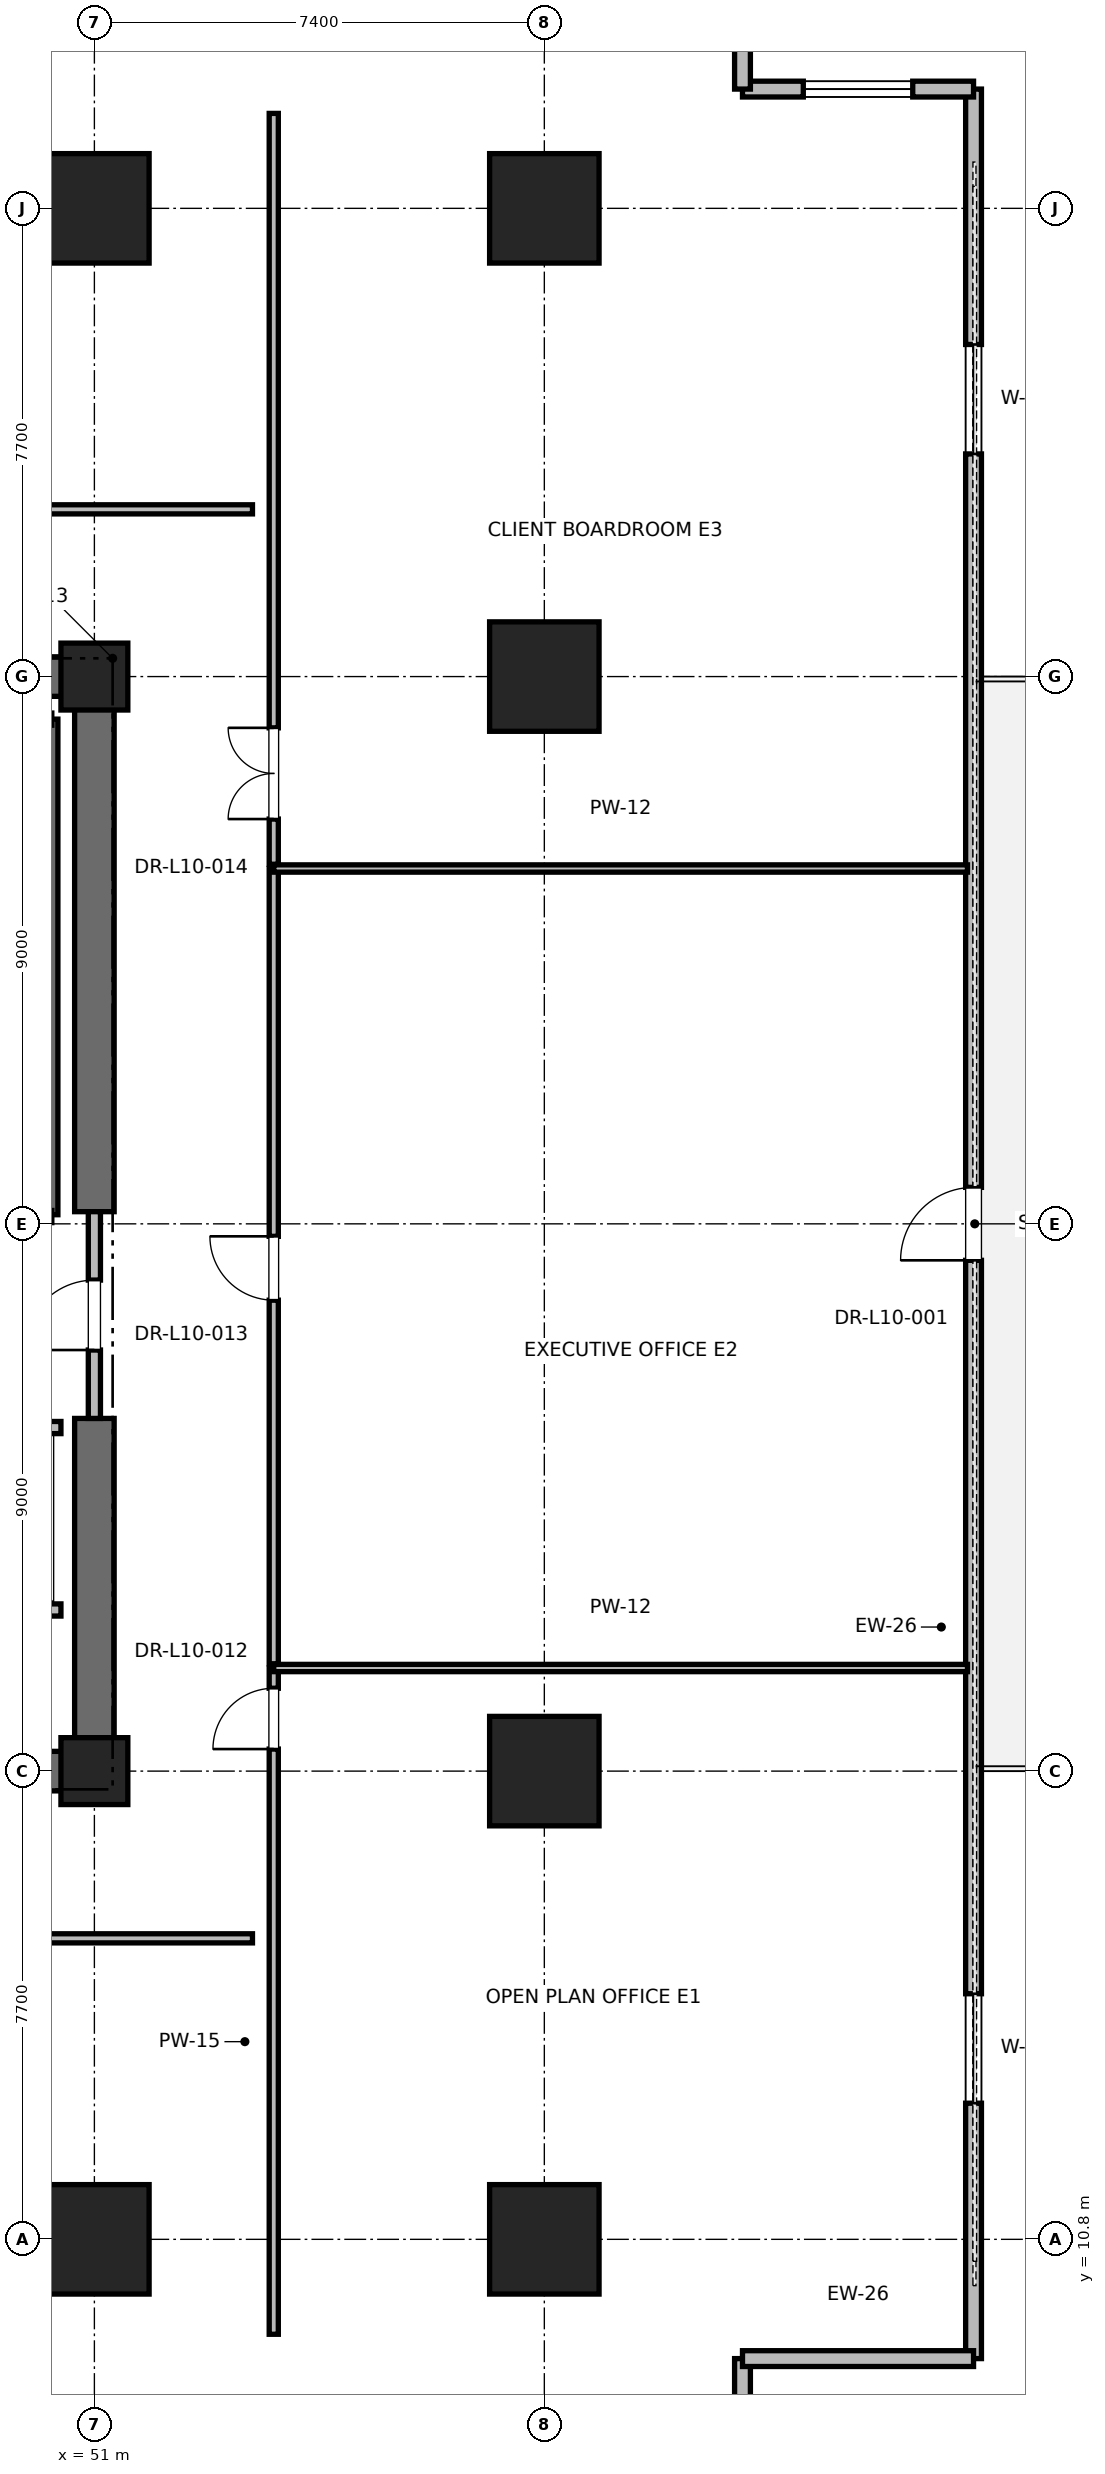
"""IFC4 building model, lengths in metres.
Left out: names, types, materials, properties, quantities, classifications, styles, units other than length and angle.
Written with IfcOpenShell. Run it as: python <this file> out.ifc"""

import sys

from ifc_helpers import new_model, si_unit, direction, frame, frame_2d, origin, origin_2d, place, context, subcontext, project, spatial, rectangle, extrude, element, fill, save


model = new_model("IFC4")
c1 = context("Model", 3, precision=1e-05, world=origin(), true_north=direction((0.0, 1.0)))
c2 = subcontext(c1, "Body", "Model", "MODEL_VIEW")
j1 = project(units=[si_unit("LENGTHUNIT", "METRE"), si_unit("PLANEANGLEUNIT", "RADIAN")], contexts=[c1])
p1 = place(None, origin())
s1 = spatial("IfcSite", under=j1, at=p1, CompositionType="ELEMENT")
p2 = place(p1, origin())
s2 = spatial("IfcBuilding", under=s1, at=p2, CompositionType="ELEMENT")
p3 = place(p2, frame((0.0, 0.0, 47.6)))
s3 = spatial("IfcBuildingStorey", under=s2, at=p3, CompositionType="ELEMENT", Elevation=47.6)
for number, where, z_axis, x_axis in (
    (1, (51.0, 10.8, 0.0), (0.0, 0.0, 1.0), (1.0, 0.0, 0.0)),
    (2, (51.0, 44.2, 0.0), (0.0, 0.0, 1.0), (1.0, 0.0, 0.0)),
    (3, (58.4, 18.5, 0.0), (0.0, 0.0, 1.0), (1.0, 0.0, 0.0)),
    (4, (58.4, 36.5, 0.0), (0.0, 0.0, 1.0), (1.0, 0.0, 0.0)),
    (5, (58.4, 10.8, 0.0), (0.0, 0.0, 1.0), (1.0, 0.0, 0.0)),
    (6, (58.4, 44.2, 0.0), (0.0, 0.0, 1.0), (1.0, 0.0, 0.0)),
):
    element("IfcColumn", number, at=place(p3, frame(where, z_axis=z_axis, x_axis=x_axis)), inside=s3, PredefinedType="COLUMN", context=c2, shape_type="SweptSolid", body=[
        extrude(rectangle(XDim=1.8, YDim=1.8, at=origin_2d()), origin(), (0.0, 0.0, 1.0), 4.0),
    ])
for number, where, z_axis, x_axis in (
    (7, (51.0, 18.5, 0.0), (0.0, 0.0, 1.0), (1.0, 0.0, 0.0)),
    (8, (51.0, 36.5, 0.0), (0.0, 0.0, 1.0), (1.0, 0.0, 0.0)),
):
    element("IfcColumn", number, at=place(p3, frame(where, z_axis=z_axis, x_axis=x_axis)), inside=s3, PredefinedType="PILASTER", context=c2, shape_type="SweptSolid", body=[
        extrude(rectangle(XDim=1.1, YDim=1.1, at=origin_2d()), origin(), (0.0, 0.0, 1.0), 4.0),
    ])
p4 = place(p3, frame((41.8, 18.5, 0.0), z_axis=(0.0, 0.0, 1.0), x_axis=(1.0, 0.0, 0.0)))
e9 = element("IfcWall", 9, at=p4, inside=s3, PredefinedType="SHEAR", context=c2, shape_type="SweptSolid", body=[
    extrude(rectangle(XDim=9.2, YDim=0.65, at=frame_2d((4.6, 0.0))), origin(), (0.0, 0.0, 1.0), 3.76),
])
for number, where, z_axis, x_axis in (
    (10, (45.2, 36.5, 0.0), (0.0, 0.0, 1.0), (1.0, 0.0, 0.0)),
    (11, (51.0, 18.5, 0.0), (0.0, 0.0, 1.0), (0.0, 1.0, 0.0)),
):
    element("IfcWall", number, at=place(p3, frame(where, z_axis=z_axis, x_axis=x_axis)), inside=s3, PredefinedType="SHEAR", context=c2, shape_type="SweptSolid", body=[
        extrude(rectangle(XDim=5.8, YDim=0.65, at=frame_2d((2.9, 0.0))), origin(), (0.0, 0.0, 1.0), 3.76),
    ])
p5 = place(p3, frame((51.0, 27.7, 0.0), z_axis=(0.0, 0.0, 1.0), x_axis=(0.0, 1.0, 0.0)))
e12 = element("IfcWall", 12, at=p5, inside=s3, PredefinedType="SHEAR", context=c2, shape_type="SweptSolid", body=[
    extrude(rectangle(XDim=8.8, YDim=0.65, at=frame_2d((4.4, 0.0))), origin(), (0.0, 0.0, 1.0), 3.76),
])
p6 = place(p3, frame((65.459, 8.839, 0.0), z_axis=(0.0, 0.0, 1.0), x_axis=(0.0, 1.0, 0.0)))
e13 = element("IfcWall", 13, at=p6, inside=s3, PredefinedType="PARAPET", context=c2, shape_type="SweptSolid", body=[
    extrude(rectangle(XDim=37.323, YDim=0.26, at=frame_2d((18.661, 0.0))), origin(), (0.0, 0.0, 1.0), 2.889),
])
p7 = place(p6, frame((4.2, 0.0, 0.85)))
e14 = element("IfcOpeningElement", 14, at=p7, cuts=e13, PredefinedType="OPENING", context=c2, shape_type="SweptSolid", body=[
    extrude(rectangle(XDim=1.8, YDim=2.2, at=frame_2d((0.9, 1.1))), frame((0.0, 0.13, 0.0), z_axis=(0.0, -1.0, 0.0), x_axis=(1.0, 0.0, 0.0)), (0.0, 0.0, 1.0), 0.26),
])
p8 = place(p6, frame((18.061, 0.0, 0.0)))
e15 = element("IfcOpeningElement", 15, at=p8, cuts=e13, PredefinedType="OPENING", context=c2, shape_type="SweptSolid", body=[
    extrude(rectangle(XDim=1.2, YDim=2.2, at=frame_2d((0.6, 1.1))), frame((0.0, 0.13, 0.0), z_axis=(0.0, -1.0, 0.0), x_axis=(1.0, 0.0, 0.0)), (0.0, 0.0, 1.0), 0.26),
])
p9 = place(p6, frame((31.323, 0.0, 0.85)))
e16 = element("IfcOpeningElement", 16, at=p9, cuts=e13, PredefinedType="OPENING", context=c2, shape_type="SweptSolid", body=[
    extrude(rectangle(XDim=1.8, YDim=2.2, at=frame_2d((0.9, 1.1))), frame((0.0, 0.13, 0.0), z_axis=(0.0, -1.0, 0.0), x_axis=(1.0, 0.0, 0.0)), (0.0, 0.0, 1.0), 0.26),
])
p10 = place(p3, frame((61.659, 5.439, 0.0), z_axis=(0.0, 0.0, 1.0), x_axis=(0.0, 1.0, 0.0)))
e17 = element("IfcWall", 17, at=p10, inside=s3, PredefinedType="PARAPET", context=c2, shape_type="SweptSolid", body=[
    extrude(rectangle(XDim=3.4, YDim=0.26, at=frame_2d((1.7, 0.0))), origin(), (0.0, 0.0, 1.0), 3.76),
])
p11 = place(p10, frame((0.8, 0.0, 0.85)))
e18 = element("IfcOpeningElement", 18, at=p11, cuts=e17, PredefinedType="OPENING", context=c2, shape_type="SweptSolid", body=[
    extrude(rectangle(XDim=1.8, YDim=2.2, at=frame_2d((0.9, 1.1))), frame((0.0, 0.13, 0.0), z_axis=(0.0, -1.0, 0.0), x_axis=(1.0, 0.0, 0.0)), (0.0, 0.0, 1.0), 0.26),
])
p12 = place(p3, frame((61.659, 8.839, 0.0), z_axis=(0.0, 0.0, 1.0), x_axis=(1.0, 0.0, 0.0)))
e19 = element("IfcWall", 19, at=p12, inside=s3, PredefinedType="PARAPET", context=c2, shape_type="SweptSolid", body=[
    extrude(rectangle(XDim=3.8, YDim=0.26, at=frame_2d((1.9, 0.0))), origin(), (0.0, 0.0, 1.0), 3.76),
])
p13 = place(p3, frame((65.459, 46.161, 0.0), z_axis=(0.0, 0.0, 1.0), x_axis=(-1.0, 0.0, 0.0)))
e20 = element("IfcWall", 20, at=p13, inside=s3, PredefinedType="PARAPET", context=c2, shape_type="SweptSolid", body=[
    extrude(rectangle(XDim=3.8, YDim=0.26, at=frame_2d((1.9, 0.0))), origin(), (0.0, 0.0, 1.0), 3.76),
])
p14 = place(p13, frame((1.0, 0.0, 0.85)))
e21 = element("IfcOpeningElement", 21, at=p14, cuts=e20, PredefinedType="OPENING", context=c2, shape_type="SweptSolid", body=[
    extrude(rectangle(XDim=1.8, YDim=2.2, at=frame_2d((0.9, 1.1))), frame((0.0, 0.13, 0.0), z_axis=(0.0, -1.0, 0.0), x_axis=(1.0, 0.0, 0.0)), (0.0, 0.0, 1.0), 0.26),
])
p15 = place(p3, frame((61.659, 46.161, 0.0), z_axis=(0.0, 0.0, 1.0), x_axis=(0.0, 1.0, 0.0)))
e22 = element("IfcWall", 22, at=p15, inside=s3, PredefinedType="PARAPET", context=c2, shape_type="SweptSolid", body=[
    extrude(rectangle(XDim=3.4, YDim=0.26, at=frame_2d((1.7, 0.0))), origin(), (0.0, 0.0, 1.0), 3.76),
])
p16 = place(p3, frame((50.3, 27.65, 0.0), z_axis=(0.0, 0.0, 1.0), x_axis=(0.0, 1.0, 0.0)))
e23 = element("IfcWall", 23, at=p16, inside=s3, PredefinedType="SOLIDWALL", context=c2, shape_type="SweptSolid", body=[
    extrude(rectangle(XDim=8.15, YDim=0.2, at=frame_2d((4.075, 0.0))), origin(), (0.0, 0.0, 1.0), 3.76),
])
p17 = place(p3, frame((51.0, 24.3, 0.0), z_axis=(0.0, 0.0, 1.0), x_axis=(0.0, 1.0, 0.0)))
e24 = element("IfcWall", 24, at=p17, inside=s3, PredefinedType="PARTITIONING", context=c2, shape_type="SweptSolid", body=[
    extrude(rectangle(XDim=3.4, YDim=0.2, at=frame_2d((1.7, 0.0))), origin(), (0.0, 0.0, 1.0), 2.54),
])
p18 = place(p17, frame((1.125, 0.0, 0.0)))
e25 = element("IfcOpeningElement", 25, at=p18, cuts=e24, PredefinedType="OPENING", context=c2, shape_type="SweptSolid", body=[
    extrude(rectangle(XDim=1.15, YDim=2.2, at=frame_2d((0.575, 1.1))), frame((0.0, 0.1, 0.0), z_axis=(0.0, -1.0, 0.0), x_axis=(1.0, 0.0, 0.0)), (0.0, 0.0, 1.0), 0.2),
])
p19 = place(p3, frame((47.85, 21.15, 0.0), z_axis=(0.0, 0.0, 1.0), x_axis=(1.0, 0.0, 0.0)))
e26 = element("IfcWall", 26, at=p19, inside=s3, PredefinedType="SOLIDWALL", context=c2, shape_type="SweptSolid", body=[
    extrude(rectangle(XDim=2.6, YDim=0.2, at=frame_2d((1.3, 0.0))), origin(), (0.0, 0.0, 1.0), 3.76),
])
p20 = place(p3, frame((50.45, 24.15, 0.0), z_axis=(0.0, 0.0, 1.0), x_axis=(-1.0, 0.0, 0.0)))
e27 = element("IfcWall", 27, at=p20, inside=s3, PredefinedType="SOLIDWALL", context=c2, shape_type="SweptSolid", body=[
    extrude(rectangle(XDim=2.6, YDim=0.2, at=frame_2d((1.3, 0.0))), origin(), (0.0, 0.0, 1.0), 2.54),
])
p21 = place(p20, frame((0.75, 0.0, 0.0)))
e28 = element("IfcOpeningElement", 28, at=p21, cuts=e27, PredefinedType="OPENING", context=c2, shape_type="SweptSolid", body=[
    extrude(rectangle(XDim=1.1, YDim=2.2, at=frame_2d((0.55, 1.1))), frame((0.0, 0.1, 0.0), z_axis=(0.0, -1.0, 0.0), x_axis=(1.0, 0.0, 0.0)), (0.0, 0.0, 1.0), 0.2),
])
p22 = place(p3, frame((43.878, 39.25, 0.0), z_axis=(0.0, 0.0, 1.0), x_axis=(1.0, 0.0, 0.0)))
e29 = element("IfcWall", 29, at=p22, inside=s3, PredefinedType="PARTITIONING", context=c2, shape_type="SweptSolid", body=[
    extrude(rectangle(XDim=9.722, YDim=0.15, at=frame_2d((4.861, 0.0))), origin(), (0.0, 0.0, 1.0), 2.85),
])
p23 = place(p22, frame((4.311, 0.0, 0.0)))
e30 = element("IfcOpeningElement", 30, at=p23, cuts=e29, PredefinedType="OPENING", context=c2, shape_type="SweptSolid", body=[
    extrude(rectangle(XDim=1.0, YDim=2.15, at=frame_2d((0.5, 1.075))), frame((0.0, 0.075, 0.0), z_axis=(0.0, -1.0, 0.0), x_axis=(1.0, 0.0, 0.0)), (0.0, 0.0, 1.0), 0.15),
])
p24 = place(p3, frame((38.982, 15.75, 0.0), z_axis=(0.0, 0.0, 1.0), x_axis=(1.0, 0.0, 0.0)))
e31 = element("IfcWall", 31, at=p24, inside=s3, PredefinedType="PARTITIONING", context=c2, shape_type="SweptSolid", body=[
    extrude(rectangle(XDim=14.618, YDim=0.15, at=frame_2d((7.309, 0.0))), origin(), (0.0, 0.0, 1.0), 2.85),
])
p25 = place(p24, frame((6.759, 0.0, 0.0)))
e32 = element("IfcOpeningElement", 32, at=p25, cuts=e31, PredefinedType="OPENING", context=c2, shape_type="SweptSolid", body=[
    extrude(rectangle(XDim=1.0, YDim=2.15, at=frame_2d((0.5, 1.075))), frame((0.0, 0.075, 0.0), z_axis=(0.0, -1.0, 0.0), x_axis=(1.0, 0.0, 0.0)), (0.0, 0.0, 1.0), 0.15),
])
p26 = place(p3, frame((53.95, 9.239, 0.0), z_axis=(0.0, 0.0, 1.0), x_axis=(0.0, 1.0, 0.0)))
e33 = element("IfcWall", 33, at=p26, inside=s3, PredefinedType="PARTITIONING", context=c2, shape_type="SweptSolid", body=[
    extrude(rectangle(XDim=10.957, YDim=0.15, at=frame_2d((5.479, 0.0))), origin(), (0.0, 0.0, 1.0), 2.85),
])
p27 = place(p26, frame((9.624, 0.0, 0.0)))
e34 = element("IfcOpeningElement", 34, at=p27, cuts=e33, PredefinedType="OPENING", context=c2, shape_type="SweptSolid", body=[
    extrude(rectangle(XDim=1.0, YDim=2.15, at=frame_2d((0.5, 1.075))), frame((0.0, 0.075, 0.0), z_axis=(0.0, -1.0, 0.0), x_axis=(1.0, 0.0, 0.0)), (0.0, 0.0, 1.0), 0.15),
])
p28 = place(p3, frame((53.95, 20.196, 0.0), z_axis=(0.0, 0.0, 1.0), x_axis=(1.0, 0.0, 0.0)))
e35 = element("IfcWall", 35, at=p28, inside=s3, PredefinedType="PARTITIONING", context=c2, shape_type="SweptSolid", body=[
    extrude(rectangle(XDim=11.409, YDim=0.12, at=frame_2d((5.705, 0.0))), origin(), (0.0, 0.0, 1.0), 2.85),
])
p29 = place(p3, frame((53.95, 20.265, 0.0), z_axis=(0.0, 0.0, 1.0), x_axis=(0.0, 1.0, 0.0)))
e36 = element("IfcWall", 36, at=p29, inside=s3, PredefinedType="PARTITIONING", context=c2, shape_type="SweptSolid", body=[
    extrude(rectangle(XDim=13.078, YDim=0.15, at=frame_2d((6.539, 0.0))), origin(), (0.0, 0.0, 1.0), 2.85),
])
p30 = place(p29, frame((5.979, 0.0, 0.0)))
e37 = element("IfcOpeningElement", 37, at=p30, cuts=e36, PredefinedType="OPENING", context=c2, shape_type="SweptSolid", body=[
    extrude(rectangle(XDim=1.05, YDim=2.2, at=frame_2d((0.525, 1.1))), frame((0.0, 0.075, 0.0), z_axis=(0.0, -1.0, 0.0), x_axis=(1.0, 0.0, 0.0)), (0.0, 0.0, 1.0), 0.15),
])
p31 = place(p3, frame((53.95, 33.344, 0.0), z_axis=(0.0, 0.0, 1.0), x_axis=(1.0, 0.0, 0.0)))
e38 = element("IfcWall", 38, at=p31, inside=s3, PredefinedType="PARTITIONING", context=c2, shape_type="SweptSolid", body=[
    extrude(rectangle(XDim=11.409, YDim=0.12, at=frame_2d((5.705, 0.0))), origin(), (0.0, 0.0, 1.0), 2.85),
])
p32 = place(p3, frame((53.95, 33.414, 0.0), z_axis=(0.0, 0.0, 1.0), x_axis=(0.0, 1.0, 0.0)))
e39 = element("IfcWall", 39, at=p32, inside=s3, PredefinedType="PARTITIONING", context=c2, shape_type="SweptSolid", body=[
    extrude(rectangle(XDim=12.348, YDim=0.15, at=frame_2d((6.174, 0.0))), origin(), (0.0, 0.0, 1.0), 2.85),
])
p33 = place(p32, frame((0.743, 0.0, 0.0)))
e40 = element("IfcOpeningElement", 40, at=p33, cuts=e39, PredefinedType="OPENING", context=c2, shape_type="SweptSolid", body=[
    extrude(rectangle(XDim=1.5, YDim=2.25, at=frame_2d((0.75, 1.125))), frame((0.0, 0.075, 0.0), z_axis=(0.0, -1.0, 0.0), x_axis=(1.0, 0.0, 0.0)), (0.0, 0.0, 1.0), 0.15),
])
p34 = place(p7, origin())
e41 = element("IfcWindow", 41, at=p34, inside=s3, PartitioningType="SINGLE_PANEL", PredefinedType="WINDOW", context=c2, shape_type="SweptSolid", body=[
    extrude(rectangle(XDim=1.8, YDim=2.2, at=frame_2d((0.9, 1.1))), frame((0.0, 0.03, 0.0), z_axis=(0.0, -1.0, 0.0), x_axis=(1.0, 0.0, 0.0)), (0.0, 0.0, 1.0), 0.06),
])
fill(e14, e41)
p35 = place(p8, origin())
e42 = element("IfcDoor", 42, at=p35, inside=s3, OperationType="SINGLE_SWING_LEFT", PredefinedType="DOOR", context=c2, shape_type="SweptSolid", body=[
    extrude(rectangle(XDim=1.2, YDim=2.2, at=frame_2d((0.6, 1.1))), frame((0.0, 0.025, 0.0), z_axis=(0.0, -1.0, 0.0), x_axis=(1.0, 0.0, 0.0)), (0.0, 0.0, 1.0), 0.05),
])
fill(e15, e42)
p36 = place(p9, origin())
e43 = element("IfcWindow", 43, at=p36, inside=s3, PartitioningType="SINGLE_PANEL", PredefinedType="WINDOW", context=c2, shape_type="SweptSolid", body=[
    extrude(rectangle(XDim=1.8, YDim=2.2, at=frame_2d((0.9, 1.1))), frame((0.0, 0.03, 0.0), z_axis=(0.0, -1.0, 0.0), x_axis=(1.0, 0.0, 0.0)), (0.0, 0.0, 1.0), 0.06),
])
fill(e16, e43)
p37 = place(p14, origin())
e44 = element("IfcWindow", 44, at=p37, inside=s3, PartitioningType="SINGLE_PANEL", PredefinedType="WINDOW", context=c2, shape_type="SweptSolid", body=[
    extrude(rectangle(XDim=1.8, YDim=2.2, at=frame_2d((0.9, 1.1))), frame((0.0, 0.03, 0.0), z_axis=(0.0, -1.0, 0.0), x_axis=(1.0, 0.0, 0.0)), (0.0, 0.0, 1.0), 0.06),
])
fill(e21, e44)
p38 = place(p18, origin())
e45 = element("IfcDoor", 45, at=p38, inside=s3, OperationType="SINGLE_SWING_LEFT", PredefinedType="DOOR", context=c2, shape_type="SweptSolid", body=[
    extrude(rectangle(XDim=1.15, YDim=2.2, at=frame_2d((0.575, 1.1))), frame((0.0, 0.025, 0.0), z_axis=(0.0, -1.0, 0.0), x_axis=(1.0, 0.0, 0.0)), (0.0, 0.0, 1.0), 0.05),
])
fill(e25, e45)
p39 = place(p27, origin())
e46 = element("IfcDoor", 46, at=p39, inside=s3, OperationType="SINGLE_SWING_LEFT", PredefinedType="DOOR", context=c2, shape_type="SweptSolid", body=[
    extrude(rectangle(XDim=1.0, YDim=2.15, at=frame_2d((0.5, 1.075))), frame((0.0, 0.025, 0.0), z_axis=(0.0, -1.0, 0.0), x_axis=(1.0, 0.0, 0.0)), (0.0, 0.0, 1.0), 0.05),
])
fill(e34, e46)
p40 = place(p30, origin())
e47 = element("IfcDoor", 47, at=p40, inside=s3, OperationType="SINGLE_SWING_RIGHT", PredefinedType="DOOR", context=c2, shape_type="SweptSolid", body=[
    extrude(rectangle(XDim=1.05, YDim=2.2, at=frame_2d((0.525, 1.1))), frame((0.0, 0.025, 0.0), z_axis=(0.0, -1.0, 0.0), x_axis=(1.0, 0.0, 0.0)), (0.0, 0.0, 1.0), 0.05),
])
fill(e37, e47)
p41 = place(p33, origin())
e48 = element("IfcDoor", 48, at=p41, inside=s3, OperationType="DOUBLE_DOOR_SINGLE_SWING", PredefinedType="DOOR", context=c2, shape_type="SweptSolid", body=[
    extrude(rectangle(XDim=1.5, YDim=2.25, at=frame_2d((0.75, 1.125))), frame((0.0, 0.025, 0.0), z_axis=(0.0, -1.0, 0.0), x_axis=(1.0, 0.0, 0.0)), (0.0, 0.0, 1.0), 0.05),
])
fill(e40, e48)
save(model, sys.argv[1])
